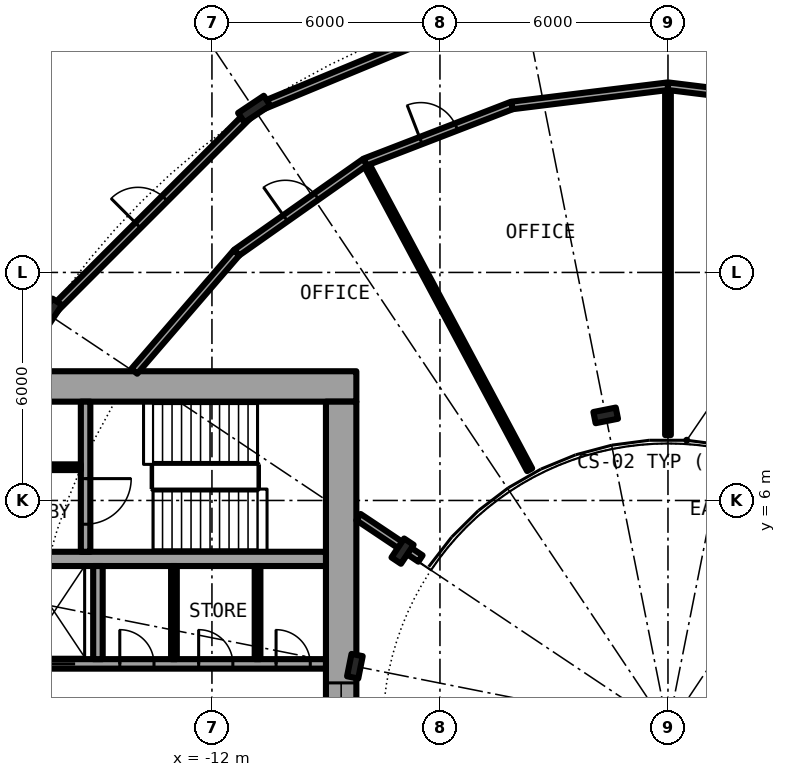
"""IFC4 building model, lengths in metres.
Left out: names, types, materials, properties, quantities, classifications, styles, units other than length and angle.
Written with IfcOpenShell. Run it as: python <this file> out.ifc"""

import sys

from ifc_helpers import new_model, si_unit, direction, frame, frame_2d, origin, origin_2d, place, context, subcontext, project, spatial, rectangle, i_section, extrude, element, fill, save


model = new_model("IFC4")
c1 = context("Model", 3, precision=1e-05, world=origin(), true_north=direction((0.0, 1.0)))
c2 = subcontext(c1, "Body", "Model", "MODEL_VIEW")
j1 = project(units=[si_unit("LENGTHUNIT", "METRE"), si_unit("PLANEANGLEUNIT", "RADIAN")], contexts=[c1])
p1 = place(None, origin())
s1 = spatial("IfcSite", under=j1, at=p1, CompositionType="ELEMENT")
p2 = place(p1, origin())
s2 = spatial("IfcBuilding", under=s1, at=p2, CompositionType="ELEMENT")
p3 = place(p2, frame((0.0, 0.0, 9.6)))
s3 = spatial("IfcBuildingStorey", under=s2, at=p3, CompositionType="ELEMENT", Elevation=9.6)
for number, where, z_axis, x_axis in (
    (1, (-10.889, 16.297, 0.0), (0.0, 0.0, 1.0), (-0.556, 0.831, 0.0)),
    (2, (-16.297, 10.889, 0.0), (0.0, 0.0, 1.0), (-0.831, 0.556, 0.0)),
):
    element("IfcColumn", number, at=place(p3, frame(where, z_axis=z_axis, x_axis=x_axis)), inside=s3, PredefinedType="COLUMN", context=c2, shape_type="SweptSolid", body=[
        extrude(i_section(OverallWidth=0.303, OverallDepth=0.814, WebThickness=0.021, FlangeThickness=0.04, FilletRadius=0.03, at=origin_2d()), origin(), (0.0, 0.0, 1.0), 4.5),
    ])
for number, where, z_axis, x_axis in (
    (3, (-1.639, 8.239, 0.0), (0.0, 0.0, 1.0), (-0.195, 0.981, 0.0)),
    (4, (-6.984, 4.667, 0.0), (0.0, 0.0, 1.0), (-0.831, 0.556, 0.0)),
    (5, (-8.239, 1.639, 0.0), (0.0, 0.0, 1.0), (-0.981, 0.195, 0.0)),
):
    element("IfcColumn", number, at=place(p3, frame(where, z_axis=z_axis, x_axis=x_axis)), inside=s3, PredefinedType="COLUMN", context=c2, shape_type="SweptSolid", body=[
        extrude(i_section(OverallWidth=0.3, OverallDepth=0.6, WebThickness=0.015, FlangeThickness=0.03, FilletRadius=0.027, at=origin_2d()), origin(), (0.0, 0.0, 1.0), 4.5),
    ])
p4 = place(p3, frame((-8.2, 9.0, 0.0), z_axis=(0.0, 0.0, 1.0), x_axis=(-1.0, 0.0, 0.0)))
e6 = element("IfcWall", 6, at=p4, inside=s3, PredefinedType="SHEAR", context=c2, shape_type="SweptSolid", body=[
    extrude(rectangle(XDim=14.2, YDim=0.8, at=frame_2d((7.1, 0.0))), origin(), (0.0, 0.0, 1.0), 4.5),
])
p5 = place(p4, frame((11.675, 0.0, 0.0)))
e7 = element("IfcOpeningElement", 7, at=p5, cuts=e6, PredefinedType="OPENING", context=c2, shape_type="SweptSolid", body=[
    extrude(rectangle(XDim=1.2, YDim=2.3, at=frame_2d((0.6, 1.15))), frame((0.0, 0.41, 0.0), z_axis=(0.0, -1.0, 0.0), x_axis=(1.0, 0.0, 0.0)), (0.0, 0.0, 1.0), 0.82),
])
p6 = place(p3, frame((-8.6, 8.6, 0.0), z_axis=(0.0, 0.0, 1.0), x_axis=(0.0, -1.0, 0.0)))
e8 = element("IfcWall", 8, at=p6, inside=s3, PredefinedType="SHEAR", context=c2, shape_type="SweptSolid", body=[
    extrude(rectangle(XDim=17.2, YDim=0.8, at=frame_2d((8.6, 0.0))), origin(), (0.0, 0.0, 1.0), 4.5),
])
p7 = place(p6, frame((7.4, 0.0, 0.1)))
e9 = element("IfcOpeningElement", 9, at=p7, cuts=e8, PredefinedType="OPENING", context=c2, shape_type="SweptSolid", body=[
    extrude(rectangle(XDim=2.4, YDim=2.2, at=frame_2d((1.2, 1.1))), frame((0.0, 0.41, 0.0), z_axis=(0.0, -1.0, 0.0), x_axis=(1.0, 0.0, 0.0)), (0.0, 0.0, 1.0), 0.82),
])
p8 = place(p3, frame((-19.15, 1.7, 0.0), z_axis=(0.0, 0.0, 1.0), x_axis=(1.0, 0.0, 0.0)))
e10 = element("IfcWall", 10, at=p8, inside=s3, PredefinedType="SHEAR", context=c2, shape_type="SweptSolid", body=[
    extrude(rectangle(XDim=10.15, YDim=0.25, at=frame_2d((5.075, 0.0))), origin(), (0.0, 0.0, 1.0), 4.5),
])
p9 = place(p8, frame((2.45, 0.0, 0.0)))
e11 = element("IfcOpeningElement", 11, at=p9, cuts=e10, PredefinedType="OPENING", context=c2, shape_type="SweptSolid", body=[
    extrude(rectangle(XDim=1.1, YDim=2.3, at=frame_2d((0.55, 1.15))), frame((0.0, 0.135, 0.0), z_axis=(0.0, -1.0, 0.0), x_axis=(1.0, 0.0, 0.0)), (0.0, 0.0, 1.0), 0.27),
])
p10 = place(p8, frame((8.837, 0.0, 0.0)))
e12 = element("IfcOpeningElement", 12, at=p10, cuts=e10, PredefinedType="OPENING", context=c2, shape_type="SweptSolid", body=[
    extrude(rectangle(XDim=0.9, YDim=2.3, at=frame_2d((0.45, 1.15))), frame((0.0, 0.135, 0.0), z_axis=(0.0, -1.0, 0.0), x_axis=(1.0, 0.0, 0.0)), (0.0, 0.0, 1.0), 0.27),
])
p11 = place(p8, frame((6.8, 0.0, 0.0)))
e13 = element("IfcOpeningElement", 13, at=p11, cuts=e10, PredefinedType="OPENING", context=c2, shape_type="SweptSolid", body=[
    extrude(rectangle(XDim=0.9, YDim=2.3, at=frame_2d((0.45, 1.15))), frame((0.0, 0.135, 0.0), z_axis=(0.0, -1.0, 0.0), x_axis=(1.0, 0.0, 0.0)), (0.0, 0.0, 1.0), 0.27),
])
p12 = place(p8, frame((4.725, 0.0, 0.0)))
e14 = element("IfcOpeningElement", 14, at=p12, cuts=e10, PredefinedType="OPENING", context=c2, shape_type="SweptSolid", body=[
    extrude(rectangle(XDim=0.9, YDim=2.3, at=frame_2d((0.45, 1.15))), frame((0.0, 0.135, 0.0), z_axis=(0.0, -1.0, 0.0), x_axis=(1.0, 0.0, 0.0)), (0.0, 0.0, 1.0), 0.27),
])
p13 = place(p3, frame((-9.0, 4.462, 0.0), z_axis=(0.0, 0.0, 1.0), x_axis=(-1.0, 0.0, 0.0)))
e15 = element("IfcWall", 15, at=p13, inside=s3, PredefinedType="SHEAR", context=c2, shape_type="SweptSolid", body=[
    extrude(rectangle(XDim=10.15, YDim=0.375, at=frame_2d((5.075, 0.0))), origin(), (0.0, 0.0, 1.0), 4.5),
])
p14 = place(p3, frame((-15.325, 8.6, 0.0), z_axis=(0.0, 0.0, 1.0), x_axis=(0.0, -1.0, 0.0)))
e16 = element("IfcWall", 16, at=p14, inside=s3, PredefinedType="SHEAR", context=c2, shape_type="SweptSolid", body=[
    extrude(rectangle(XDim=3.95, YDim=0.25, at=frame_2d((1.975, 0.0))), origin(), (0.0, 0.0, 1.0), 4.5),
])
p15 = place(p14, frame((2.025, 0.0, 0.0)))
e17 = element("IfcOpeningElement", 17, at=p15, cuts=e16, PredefinedType="OPENING", context=c2, shape_type="SweptSolid", body=[
    extrude(rectangle(XDim=1.2, YDim=2.3, at=frame_2d((0.6, 1.15))), frame((0.0, 0.135, 0.0), z_axis=(0.0, -1.0, 0.0), x_axis=(1.0, 0.0, 0.0)), (0.0, 0.0, 1.0), 0.27),
])
p16 = place(p3, frame((-15.0, 1.825, 0.0), z_axis=(0.0, 0.0, 1.0), x_axis=(0.0, 1.0, 0.0)))
e18 = element("IfcWall", 18, at=p16, inside=s3, PredefinedType="SOLIDWALL", context=c2, shape_type="SweptSolid", body=[
    extrude(rectangle(XDim=2.45, YDim=0.25, at=frame_2d((1.225, 0.0))), origin(), (0.0, 0.0, 1.0), 4.05),
])
for number, where, z_axis, x_axis in (
    (19, (-10.8, 1.825, 0.0), (0.0, 0.0, 1.0), (0.0, 1.0, 0.0)),
    (20, (-13.0, 1.825, 0.0), (0.0, 0.0, 1.0), (0.0, 1.0, 0.0)),
):
    element("IfcWall", number, at=place(p3, frame(where, z_axis=z_axis, x_axis=x_axis)), inside=s3, PredefinedType="PARTITIONING", context=c2, shape_type="SweptSolid", body=[
        extrude(rectangle(XDim=2.45, YDim=0.15, at=frame_2d((1.225, 0.0))), origin(), (0.0, 0.0, 1.0), 4.05),
    ])
p17 = place(p3, frame((-15.45, 6.875, 0.0), z_axis=(0.0, 0.0, 1.0), x_axis=(-1.0, 0.0, 0.0)))
e21 = element("IfcWall", 21, at=p17, inside=s3, PredefinedType="PARTITIONING", context=c2, shape_type="SweptSolid", body=[
    extrude(rectangle(XDim=3.7, YDim=0.15, at=frame_2d((1.85, 0.0))), origin(), (0.0, 0.0, 1.0), 4.05),
])
p18 = place(p17, frame((1.4, 0.0, 0.0)))
e22 = element("IfcOpeningElement", 22, at=p18, cuts=e21, PredefinedType="OPENING", context=c2, shape_type="SweptSolid", body=[
    extrude(rectangle(XDim=0.9, YDim=2.3, at=frame_2d((0.45, 1.15))), frame((0.0, 0.085, 0.0), z_axis=(0.0, -1.0, 0.0), x_axis=(1.0, 0.0, 0.0)), (0.0, 0.0, 1.0), 0.17),
])
p19 = place(p3, frame((-7.968, 14.904, 0.0), z_axis=(0.0, 0.0, 1.0), x_axis=(0.471460365694, -0.881887251059, 0.0)))
e23 = element("IfcWall", 23, at=p19, inside=s3, PredefinedType="PARTITIONING", context=c2, shape_type="SweptSolid", body=[
    extrude(rectangle(XDim=9.18, YDim=0.15, at=frame_2d((4.59, 0.0))), origin(), (0.0, 0.0, 1.0), 4.05),
])
p20 = place(p3, frame((0.0, 7.72, 0.0), z_axis=(0.0, 0.0, 1.0), x_axis=(0.0, 1.0, 0.0)))
e24 = element("IfcWall", 24, at=p20, inside=s3, PredefinedType="PARTITIONING", context=c2, shape_type="SweptSolid", body=[
    extrude(rectangle(XDim=9.18, YDim=0.15, at=frame_2d((4.59, 0.0))), origin(), (0.0, 0.0, 1.0), 4.05),
])
p21 = place(p3, frame((-6.513, 4.472, 0.0), z_axis=(0.0, 0.0, 1.0), x_axis=(-0.831417956244, 0.555647533996, 0.0)))
e25 = element("IfcWall", 25, at=p21, inside=s3, PredefinedType="PARTITIONING", context=c2, shape_type="SweptSolid", body=[
    extrude(rectangle(XDim=1.962, YDim=0.2, at=frame_2d((0.981, 0.0))), origin(), (0.0, 0.0, 1.0), 4.05),
])
p22 = place(p3, frame((-14.043, 9.4, 0.0), z_axis=(0.0, 0.0, 1.0), x_axis=(0.653274518104, 0.757121129012, 0.0)))
e26 = element("IfcWall", 26, at=p22, inside=s3, PredefinedType="PARTITIONING", context=c2, shape_type="SweptSolid", body=[
    extrude(rectangle(XDim=4.124, YDim=0.2, at=frame_2d((2.062, 0.0))), origin(), (0.0, 0.0, 1.0), 4.05),
])
p23 = place(p3, frame((-11.349, 12.522, 0.0), z_axis=(0.0, 0.0, 1.0), x_axis=(0.817567680547, 0.575832517079, 0.0)))
e27 = element("IfcWall", 27, at=p23, inside=s3, PredefinedType="PARTITIONING", context=c2, shape_type="SweptSolid", body=[
    extrude(rectangle(XDim=4.137, YDim=0.2, at=frame_2d((2.068, 0.0))), origin(), (0.0, 0.0, 1.0), 4.05),
])
p24 = place(p23, frame((1.568, 0.0, 0.0)))
e28 = element("IfcOpeningElement", 28, at=p24, cuts=e27, PredefinedType="OPENING", context=c2, shape_type="SweptSolid", body=[
    extrude(rectangle(XDim=1.0, YDim=2.3, at=frame_2d((0.5, 1.15))), frame((0.0, 0.11, 0.0), z_axis=(0.0, -1.0, 0.0), x_axis=(1.0, 0.0, 0.0)), (0.0, 0.0, 1.0), 0.22),
])
p25 = place(p3, frame((-7.967, 14.904, 0.0), z_axis=(0.0, 0.0, 1.0), x_axis=(0.932943640288, 0.360022449363, 0.0)))
e29 = element("IfcWall", 29, at=p25, inside=s3, PredefinedType="PARTITIONING", context=c2, shape_type="SweptSolid", body=[
    extrude(rectangle(XDim=4.139, YDim=0.2, at=frame_2d((2.069, 0.0))), origin(), (0.0, 0.0, 1.0), 4.05),
])
p26 = place(p25, frame((1.569, 0.0, 0.0)))
e30 = element("IfcOpeningElement", 30, at=p26, cuts=e29, PredefinedType="OPENING", context=c2, shape_type="SweptSolid", body=[
    extrude(rectangle(XDim=1.0, YDim=2.3, at=frame_2d((0.5, 1.15))), frame((0.0, 0.11, 0.0), z_axis=(0.0, -1.0, 0.0), x_axis=(1.0, 0.0, 0.0)), (0.0, 0.0, 1.0), 0.22),
])
for number, where, z_axis, x_axis in (
    (31, (-4.106, 16.394, 0.0), (0.0, 0.0, 1.0), (0.992, 0.122, 0.0)),
    (32, (0.0, 16.9, 0.0), (0.0, 0.0, 1.0), (0.992, -0.122, 0.0)),
):
    element("IfcWall", number, at=place(p3, frame(where, z_axis=z_axis, x_axis=x_axis)), inside=s3, PredefinedType="PARTITIONING", context=c2, shape_type="SweptSolid", body=[
        extrude(rectangle(XDim=4.137, YDim=0.2, at=frame_2d((2.068, 0.0))), origin(), (0.0, 0.0, 1.0), 4.05),
    ])
p27 = place(p3, frame((-16.188, 10.998, 0.0), z_axis=(0.0, 0.0, 1.0), x_axis=(0.707106781187, 0.707106781187, 0.0)))
e33 = element("IfcWall", 33, at=p27, inside=s3, PredefinedType="PARTITIONING", context=c2, shape_type="SweptSolid", body=[
    extrude(rectangle(XDim=7.34, YDim=0.2, at=frame_2d((3.67, 0.0))), origin(), (0.0, 0.0, 1.0), 3.63),
])
p28 = place(p27, frame((3.17, 0.0, 0.0)))
e34 = element("IfcOpeningElement", 34, at=p28, cuts=e33, PredefinedType="OPENING", context=c2, shape_type="SweptSolid", body=[
    extrude(rectangle(XDim=1.0, YDim=2.3, at=frame_2d((0.5, 1.15))), frame((0.0, 0.11, 0.0), z_axis=(0.0, -1.0, 0.0), x_axis=(1.0, 0.0, 0.0)), (0.0, 0.0, 1.0), 0.22),
])
p29 = place(p3, frame((-10.747, 16.356, 0.0), z_axis=(0.0, 0.0, 1.0), x_axis=(0.923916253875, 0.382594767117, 0.0)))
e35 = element("IfcWall", 35, at=p29, inside=s3, PredefinedType="PARTITIONING", context=c2, shape_type="SweptSolid", body=[
    extrude(rectangle(XDim=6.626, YDim=0.2, at=frame_2d((3.313, 0.0))), origin(), (0.0, 0.0, 1.0), 3.63),
])
p30 = place(p9, origin())
e36 = element("IfcDoor", 36, at=p30, inside=s3, OperationType="DOUBLE_DOOR_SLIDING", PredefinedType="DOOR", context=c2, shape_type="SweptSolid", body=[
    extrude(rectangle(XDim=1.1, YDim=2.3, at=frame_2d((0.55, 1.15))), frame((0.0, 0.025, 0.0), z_axis=(0.0, -1.0, 0.0), x_axis=(1.0, 0.0, 0.0)), (0.0, 0.0, 1.0), 0.05),
])
fill(e11, e36)
p31 = place(p10, origin())
e37 = element("IfcDoor", 37, at=p31, inside=s3, OperationType="SINGLE_SWING_LEFT", PredefinedType="DOOR", context=c2, shape_type="SweptSolid", body=[
    extrude(rectangle(XDim=0.9, YDim=2.3, at=frame_2d((0.45, 1.15))), frame((0.0, 0.025, 0.0), z_axis=(0.0, -1.0, 0.0), x_axis=(1.0, 0.0, 0.0)), (0.0, 0.0, 1.0), 0.05),
])
fill(e12, e37)
p32 = place(p11, origin())
e38 = element("IfcDoor", 38, at=p32, inside=s3, OperationType="SINGLE_SWING_LEFT", PredefinedType="DOOR", context=c2, shape_type="SweptSolid", body=[
    extrude(rectangle(XDim=0.9, YDim=2.3, at=frame_2d((0.45, 1.15))), frame((0.0, 0.025, 0.0), z_axis=(0.0, -1.0, 0.0), x_axis=(1.0, 0.0, 0.0)), (0.0, 0.0, 1.0), 0.05),
])
fill(e13, e38)
p33 = place(p12, origin())
e39 = element("IfcDoor", 39, at=p33, inside=s3, OperationType="SINGLE_SWING_LEFT", PredefinedType="DOOR", context=c2, shape_type="SweptSolid", body=[
    extrude(rectangle(XDim=0.9, YDim=2.3, at=frame_2d((0.45, 1.15))), frame((0.0, 0.025, 0.0), z_axis=(0.0, -1.0, 0.0), x_axis=(1.0, 0.0, 0.0)), (0.0, 0.0, 1.0), 0.05),
])
fill(e14, e39)
p34 = place(p15, origin())
e40 = element("IfcDoor", 40, at=p34, inside=s3, OperationType="SINGLE_SWING_LEFT", PredefinedType="DOOR", context=c2, shape_type="SweptSolid", body=[
    extrude(rectangle(XDim=1.2, YDim=2.3, at=frame_2d((0.6, 1.15))), frame((0.0, 0.025, 0.0), z_axis=(0.0, -1.0, 0.0), x_axis=(1.0, 0.0, 0.0)), (0.0, 0.0, 1.0), 0.05),
])
fill(e17, e40)
p35 = place(p7, origin())
e41 = element("IfcWindow", 41, at=p35, inside=s3, PartitioningType="SINGLE_PANEL", PredefinedType="WINDOW", context=c2, shape_type="SweptSolid", body=[
    extrude(rectangle(XDim=2.4, YDim=2.2, at=frame_2d((1.2, 1.1))), frame((0.0, 0.03, 0.0), z_axis=(0.0, -1.0, 0.0), x_axis=(1.0, 0.0, 0.0)), (0.0, 0.0, 1.0), 0.06),
])
fill(e9, e41)
p36 = place(p28, origin())
e42 = element("IfcDoor", 42, at=p36, inside=s3, OperationType="SINGLE_SWING_RIGHT", PredefinedType="DOOR", context=c2, shape_type="SweptSolid", body=[
    extrude(rectangle(XDim=1.0, YDim=2.3, at=frame_2d((0.5, 1.15))), frame((0.0, 0.025, 0.0), z_axis=(0.0, -1.0, 0.0), x_axis=(1.0, 0.0, 0.0)), (0.0, 0.0, 1.0), 0.05),
])
fill(e34, e42)
p37 = place(p26, origin())
e43 = element("IfcDoor", 43, at=p37, inside=s3, OperationType="SINGLE_SWING_RIGHT", PredefinedType="DOOR", context=c2, shape_type="SweptSolid", body=[
    extrude(rectangle(XDim=1.0, YDim=2.3, at=frame_2d((0.5, 1.15))), frame((0.0, 0.025, 0.0), z_axis=(0.0, -1.0, 0.0), x_axis=(1.0, 0.0, 0.0)), (0.0, 0.0, 1.0), 0.05),
])
fill(e30, e43)
p38 = place(p24, origin())
e44 = element("IfcDoor", 44, at=p38, inside=s3, OperationType="SINGLE_SWING_RIGHT", PredefinedType="DOOR", context=c2, shape_type="SweptSolid", body=[
    extrude(rectangle(XDim=1.0, YDim=2.3, at=frame_2d((0.5, 1.15))), frame((0.0, 0.025, 0.0), z_axis=(0.0, -1.0, 0.0), x_axis=(1.0, 0.0, 0.0)), (0.0, 0.0, 1.0), 0.05),
])
fill(e28, e44)
save(model, sys.argv[1])
